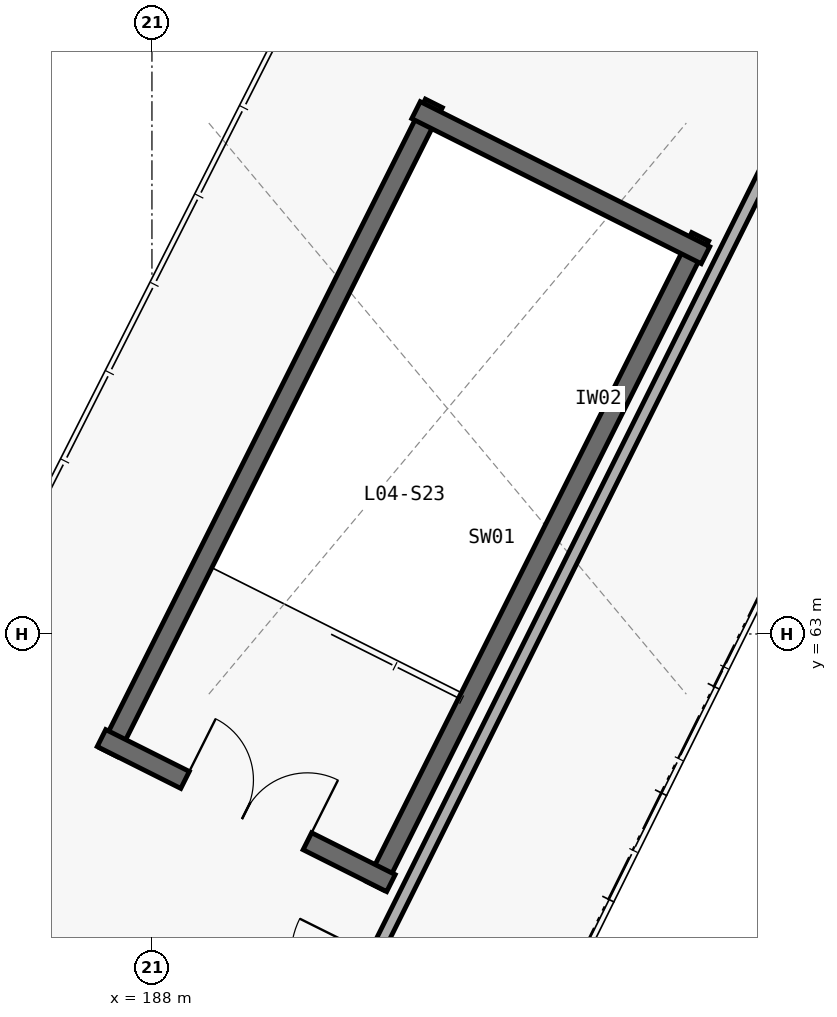
"""IFC4 building model, lengths in metres.
Left out: names, types, materials, properties, quantities, classifications, styles, units other than length and angle.
Written with IfcOpenShell. Run it as: python <this file> out.ifc"""

import sys

from ifc_helpers import new_model, si_unit, direction, frame, frame_2d, origin, place, context, subcontext, project, spatial, rectangle, extrude, element, fill, save


model = new_model("IFC4")
c1 = context("Model", 3, precision=1e-05, world=origin(), true_north=direction((0.0, 1.0)))
c2 = subcontext(c1, "Body", "Model", "MODEL_VIEW")
j1 = project(units=[si_unit("LENGTHUNIT", "METRE"), si_unit("PLANEANGLEUNIT", "RADIAN")], contexts=[c1])
p1 = place(None, origin())
s1 = spatial("IfcSite", under=j1, at=p1, CompositionType="ELEMENT")
p2 = place(p1, origin())
s2 = spatial("IfcBuilding", under=s1, at=p2, CompositionType="ELEMENT")
p3 = place(p2, frame((0.0, 0.0, 19.8)))
s3 = spatial("IfcBuildingStorey", under=s2, at=p3, CompositionType="ELEMENT", Elevation=19.8)
p4 = place(p3, frame((190.937, 59.687, 0.0), z_axis=(0.0, 0.0, 1.0), x_axis=(0.447919041961, 0.894074119885, 0.0)))
e1 = element("IfcWall", 1, at=p4, inside=s3, PredefinedType="SHEAR", context=c2, shape_type="SweptSolid", body=[
    extrude(rectangle(XDim=9.55, YDim=0.25, at=frame_2d((4.775, 0.0))), origin(), (0.0, 0.0, 1.0), 4.54),
])
p5 = place(p3, frame((191.709, 69.981, 0.0), z_axis=(0.0, 0.0, 1.0), x_axis=(-0.4479088042, -0.894079248792, 0.0)))
e2 = element("IfcWall", 2, at=p5, inside=s3, PredefinedType="SHEAR", context=c2, shape_type="SweptSolid", body=[
    extrude(rectangle(XDim=9.55, YDim=0.25, at=frame_2d((4.775, 0.0))), origin(), (0.0, 0.0, 1.0), 4.54),
])
p6 = place(p3, frame((187.336, 61.63, 0.0), z_axis=(0.0, 0.0, 1.0), x_axis=(0.894071595331, -0.447924081092, 0.0)))
e3 = element("IfcWall", 3, at=p6, inside=s3, PredefinedType="SHEAR", context=c2, shape_type="SweptSolid", body=[
    extrude(rectangle(XDim=4.26, YDim=0.25, at=frame_2d((2.13, 0.0))), origin(), (0.0, 0.0, 1.0), 4.54),
])
p7 = place(p6, frame((1.23, 0.0, 0.0)))
e4 = element("IfcOpeningElement", 4, at=p7, cuts=e3, PredefinedType="OPENING", context=c2, shape_type="SweptSolid", body=[
    extrude(rectangle(XDim=1.8, YDim=2.25, at=frame_2d((0.9, 1.125))), frame((0.0, 0.135, 0.0), z_axis=(0.0, -1.0, 0.0), x_axis=(1.0, 0.0, 0.0)), (0.0, 0.0, 1.0), 0.27),
])
p8 = place(p3, frame((195.283, 67.984, 0.0), z_axis=(0.0, 0.0, 1.0), x_axis=(-0.894083048484, 0.447901219481, 0.0)))
e5 = element("IfcWall", 5, at=p8, inside=s3, PredefinedType="SHEAR", context=c2, shape_type="SweptSolid", body=[
    extrude(rectangle(XDim=4.26, YDim=0.25, at=frame_2d((2.13, 0.0))), origin(), (0.0, 0.0, 1.0), 4.54),
])
p9 = place(p3, frame((189.059, 55.01, 0.0), z_axis=(0.0, 0.0, 1.0), x_axis=(0.44590512567, 0.895080230427, 0.0)))
e6 = element("IfcWall", 6, at=p9, inside=s3, PredefinedType="PARTITIONING", context=c2, shape_type="SweptSolid", body=[
    extrude(rectangle(XDim=19.935, YDim=0.16, at=frame_2d((9.967, 0.0))), origin(), (0.0, 0.0, 1.0), 3.665),
])
p10 = place(p9, frame((3.094, 0.0, 0.0)))
e7 = element("IfcOpeningElement", 7, at=p10, cuts=e6, PredefinedType="OPENING", context=c2, shape_type="SweptSolid", body=[
    extrude(rectangle(XDim=1.1, YDim=2.15, at=frame_2d((0.55, 1.075))), frame((0.0, 0.09, 0.0), z_axis=(0.0, -1.0, 0.0), x_axis=(1.0, 0.0, 0.0)), (0.0, 0.0, 1.0), 0.18),
])
p11 = place(p7, origin())
e8 = element("IfcDoor", 8, at=p11, inside=s3, OperationType="DOUBLE_DOOR_SINGLE_SWING", PredefinedType="DOOR", context=c2, shape_type="SweptSolid", body=[
    extrude(rectangle(XDim=1.8, YDim=2.25, at=frame_2d((0.9, 1.125))), frame((0.0, 0.025, 0.0), z_axis=(0.0, -1.0, 0.0), x_axis=(1.0, 0.0, 0.0)), (0.0, 0.0, 1.0), 0.05),
])
fill(e4, e8)
save(model, sys.argv[1])
